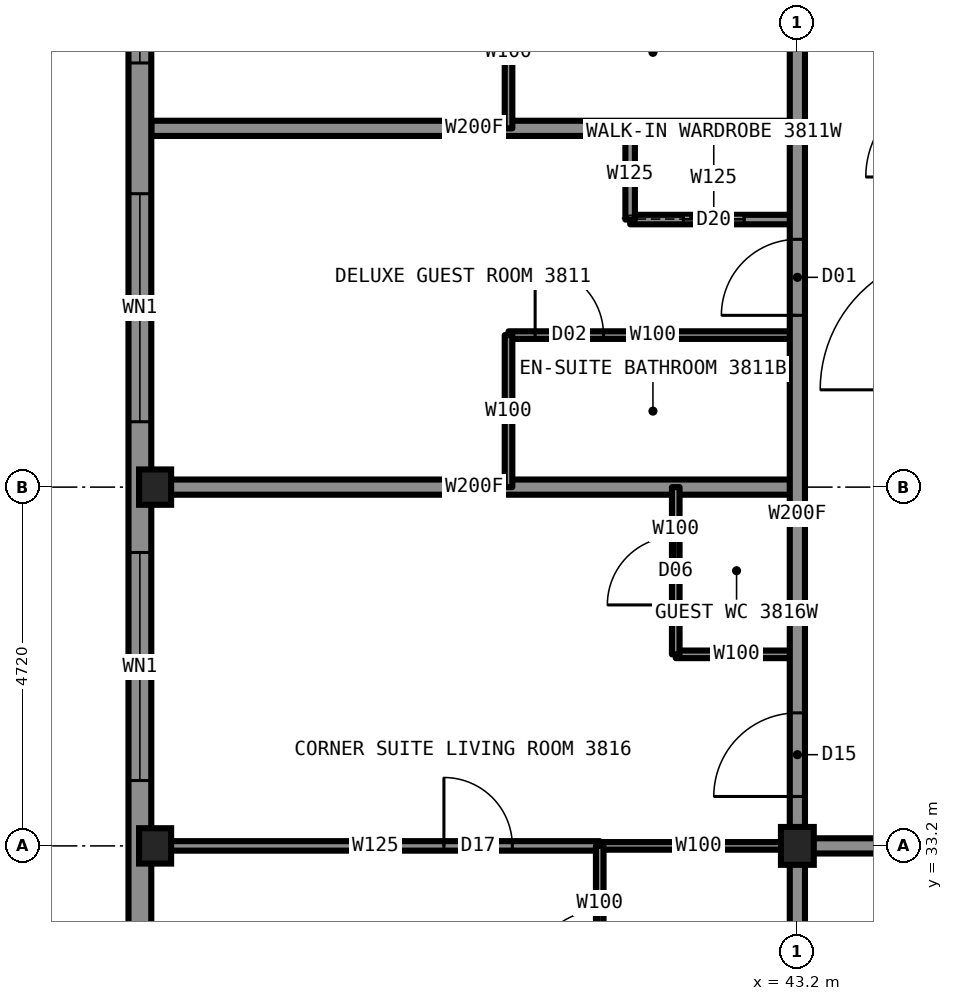
"""IFC4 building model, lengths in metres.
Left out: names, types, materials, properties, quantities, classifications, styles, units other than length and angle.
Written with IfcOpenShell. Run it as: python <this file> out.ifc"""

import sys

from ifc_helpers import new_model, si_unit, direction, frame, frame_2d, origin, origin_2d, place, context, subcontext, project, spatial, rectangle, i_section, extrude, element, fill, save


model = new_model("IFC4")
c1 = context("Model", 3, precision=1e-05, world=origin(), true_north=direction((0.0, 1.0)))
c2 = subcontext(c1, "Body", "Model", "MODEL_VIEW")
j1 = project(units=[si_unit("LENGTHUNIT", "METRE"), si_unit("PLANEANGLEUNIT", "RADIAN")], contexts=[c1])
p1 = place(None, origin())
s1 = spatial("IfcSite", under=j1, at=p1, CompositionType="ELEMENT")
p2 = place(p1, origin())
s2 = spatial("IfcBuilding", under=s1, at=p2, CompositionType="ELEMENT")
p3 = place(p2, frame((0.0, 0.0, 135.4)))
s3 = spatial("IfcBuildingStorey", under=s2, at=p3, CompositionType="ELEMENT", Elevation=135.4)
for number, where, z_axis, x_axis in (
    (1, (34.75, 33.2, 0.0), (0.0, 0.0, 1.0), (1.0, 0.0, 0.0)),
    (2, (34.75, 37.92, 0.0), (0.0, 0.0, 1.0), (1.0, 0.0, 0.0)),
):
    element("IfcColumn", number, at=place(p3, frame(where, z_axis=z_axis, x_axis=x_axis)), inside=s3, PredefinedType="COLUMN", context=c2, shape_type="SweptSolid", body=[
        extrude(i_section(OverallWidth=0.422, OverallDepth=0.465, WebThickness=0.045, FlangeThickness=0.073, at=origin_2d()), origin(), (0.0, 0.0, 1.0), 3.5),
    ])
p4 = place(p3, frame((43.2, 33.2, 0.0), z_axis=(0.0, 0.0, 1.0), x_axis=(1.0, 0.0, 0.0)))
e3 = element("IfcColumn", 3, at=p4, inside=s3, PredefinedType="COLUMN", context=c2, shape_type="SweptSolid", body=[
    extrude(i_section(OverallWidth=0.432, OverallDepth=0.498, WebThickness=0.056, FlangeThickness=0.089, at=origin_2d()), origin(), (0.0, 0.0, 1.0), 3.5),
])
p5 = place(p3, frame((40.6, 33.2, 0.0), z_axis=(0.0, 0.0, 1.0), x_axis=(1.0, 0.0, 0.0)))
e4 = element("IfcWall", 4, at=p5, inside=s3, PredefinedType="PARTITIONING", context=c2, shape_type="SweptSolid", body=[
    extrude(rectangle(XDim=2.6, YDim=0.1, at=frame_2d((1.3, 0.0))), origin(), (0.0, 0.0, 1.0), 2.573),
])
p6 = place(p3, frame((43.2, 33.2, 0.0), z_axis=(0.0, 0.0, 1.0), x_axis=(1.0, 0.0, 0.0)))
e5 = element("IfcWall", 5, at=p6, inside=s3, PredefinedType="PARTITIONING", context=c2, shape_type="SweptSolid", body=[
    extrude(rectangle(XDim=23.6, YDim=0.2, at=frame_2d((11.8, 0.0))), origin(), (0.0, 0.0, 1.0), 3.33),
])
p7 = place(p6, frame((3.0, 0.0, 0.0)))
e6 = element("IfcOpeningElement", 6, at=p7, cuts=e5, PredefinedType="OPENING", context=c2, shape_type="SweptSolid", body=[
    extrude(rectangle(XDim=1.0, YDim=2.2, at=frame_2d((0.5, 1.1))), frame((0.0, 0.11, 0.0), z_axis=(0.0, -1.0, 0.0), x_axis=(1.0, 0.0, 0.0)), (0.0, 0.0, 1.0), 0.22),
])
p8 = place(p6, frame((9.84, 0.0, 0.0)))
e7 = element("IfcOpeningElement", 7, at=p8, cuts=e5, PredefinedType="OPENING", context=c2, shape_type="SweptSolid", body=[
    extrude(rectangle(XDim=1.0, YDim=2.2, at=frame_2d((0.5, 1.1))), frame((0.0, 0.11, 0.0), z_axis=(0.0, -1.0, 0.0), x_axis=(1.0, 0.0, 0.0)), (0.0, 0.0, 1.0), 0.22),
])
p9 = place(p6, frame((16.71, 0.0, 0.0)))
e8 = element("IfcOpeningElement", 8, at=p9, cuts=e5, PredefinedType="OPENING", context=c2, shape_type="SweptSolid", body=[
    extrude(rectangle(XDim=1.0, YDim=2.2, at=frame_2d((0.5, 1.1))), frame((0.0, 0.11, 0.0), z_axis=(0.0, -1.0, 0.0), x_axis=(1.0, 0.0, 0.0)), (0.0, 0.0, 1.0), 0.22),
])
p10 = place(p6, frame((20.34, 0.0, 0.0)))
e9 = element("IfcOpeningElement", 9, at=p10, cuts=e5, PredefinedType="OPENING", context=c2, shape_type="SweptSolid", body=[
    extrude(rectangle(XDim=1.0, YDim=2.2, at=frame_2d((0.5, 1.1))), frame((0.0, 0.11, 0.0), z_axis=(0.0, -1.0, 0.0), x_axis=(1.0, 0.0, 0.0)), (0.0, 0.0, 1.0), 0.22),
])
p11 = place(p3, frame((34.7, 33.2, 0.0), z_axis=(0.0, 0.0, 1.0), x_axis=(1.0, 0.0, 0.0)))
e10 = element("IfcWall", 10, at=p11, inside=s3, PredefinedType="PARTITIONING", context=c2, shape_type="SweptSolid", body=[
    extrude(rectangle(XDim=5.9, YDim=0.125, at=frame_2d((2.95, 0.0))), origin(), (0.0, 0.0, 1.0), 2.573),
])
p12 = place(p11, frame((3.85, 0.0, 0.0)))
e11 = element("IfcOpeningElement", 11, at=p12, cuts=e10, PredefinedType="OPENING", context=c2, shape_type="SweptSolid", body=[
    extrude(rectangle(XDim=0.9, YDim=2.2, at=frame_2d((0.45, 1.1))), frame((0.0, 0.073, 0.0), z_axis=(0.0, -1.0, 0.0), x_axis=(1.0, 0.0, 0.0)), (0.0, 0.0, 1.0), 0.145),
])
p13 = place(p3, frame((34.7, 42.64, 0.0), z_axis=(0.0, 0.0, 1.0), x_axis=(1.0, 0.0, 0.0)))
e12 = element("IfcWall", 12, at=p13, inside=s3, PredefinedType="PARTITIONING", context=c2, shape_type="SweptSolid", body=[
    extrude(rectangle(XDim=8.5, YDim=0.2, at=frame_2d((4.25, 0.0))), origin(), (0.0, 0.0, 1.0), 2.731),
])
p14 = place(p3, frame((41.0, 41.44, 0.0), z_axis=(0.0, 0.0, 1.0), x_axis=(1.0, 0.0, 0.0)))
e13 = element("IfcWall", 13, at=p14, inside=s3, PredefinedType="PARTITIONING", context=c2, shape_type="SweptSolid", body=[
    extrude(rectangle(XDim=2.2, YDim=0.125, at=frame_2d((1.1, 0.0))), origin(), (0.0, 0.0, 1.0), 3.33),
])
p15 = place(p14, frame((0.7, 0.0, 0.0)))
e14 = element("IfcOpeningElement", 14, at=p15, cuts=e13, PredefinedType="OPENING", context=c2, shape_type="SweptSolid", body=[
    extrude(rectangle(XDim=0.8, YDim=2.1, at=frame_2d((0.4, 1.05))), frame((0.0, 0.073, 0.0), z_axis=(0.0, -1.0, 0.0), x_axis=(1.0, 0.0, 0.0)), (0.0, 0.0, 1.0), 0.145),
])
p16 = place(p3, frame((39.4, 39.92, 0.0), z_axis=(0.0, 0.0, 1.0), x_axis=(1.0, 0.0, 0.0)))
e15 = element("IfcWall", 15, at=p16, inside=s3, PredefinedType="PARTITIONING", context=c2, shape_type="SweptSolid", body=[
    extrude(rectangle(XDim=3.8, YDim=0.1, at=frame_2d((1.9, 0.0))), origin(), (0.0, 0.0, 1.0), 3.33),
])
p17 = place(p16, frame((0.35, 0.0, 0.0)))
e16 = element("IfcOpeningElement", 16, at=p17, cuts=e15, PredefinedType="OPENING", context=c2, shape_type="SweptSolid", body=[
    extrude(rectangle(XDim=0.9, YDim=2.1, at=frame_2d((0.45, 1.05))), frame((0.0, 0.06, 0.0), z_axis=(0.0, -1.0, 0.0), x_axis=(1.0, 0.0, 0.0)), (0.0, 0.0, 1.0), 0.12),
])
p18 = place(p3, frame((34.7, 37.92, 0.0), z_axis=(0.0, 0.0, 1.0), x_axis=(1.0, 0.0, 0.0)))
e17 = element("IfcWall", 17, at=p18, inside=s3, PredefinedType="PARTITIONING", context=c2, shape_type="SweptSolid", body=[
    extrude(rectangle(XDim=8.5, YDim=0.2, at=frame_2d((4.25, 0.0))), origin(), (0.0, 0.0, 1.0), 2.573),
])
p19 = place(p3, frame((41.6, 35.72, 0.0), z_axis=(0.0, 0.0, 1.0), x_axis=(1.0, 0.0, 0.0)))
e18 = element("IfcWall", 18, at=p19, inside=s3, PredefinedType="PARTITIONING", context=c2, shape_type="SweptSolid", body=[
    extrude(rectangle(XDim=1.6, YDim=0.1, at=frame_2d((0.8, 0.0))), origin(), (0.0, 0.0, 1.0), 3.33),
])
p20 = place(p3, frame((43.2, 33.2, 0.0), z_axis=(0.0, 0.0, 1.0), x_axis=(0.0, 1.0, 0.0)))
e19 = element("IfcWall", 19, at=p20, inside=s3, PredefinedType="PARTITIONING", context=c2, shape_type="SweptSolid", body=[
    extrude(rectangle(XDim=23.6, YDim=0.2, at=frame_2d((11.8, 0.0))), origin(), (0.0, 0.0, 1.0), 3.33),
])
p21 = place(p20, frame((6.98, 0.0, 0.0)))
e20 = element("IfcOpeningElement", 20, at=p21, cuts=e19, PredefinedType="OPENING", context=c2, shape_type="SweptSolid", body=[
    extrude(rectangle(XDim=1.0, YDim=2.2, at=frame_2d((0.5, 1.1))), frame((0.0, 0.11, 0.0), z_axis=(0.0, -1.0, 0.0), x_axis=(1.0, 0.0, 0.0)), (0.0, 0.0, 1.0), 0.22),
])
p22 = place(p20, frame((11.7, 0.0, 0.0)))
e21 = element("IfcOpeningElement", 21, at=p22, cuts=e19, PredefinedType="OPENING", context=c2, shape_type="SweptSolid", body=[
    extrude(rectangle(XDim=1.0, YDim=2.2, at=frame_2d((0.5, 1.1))), frame((0.0, 0.11, 0.0), z_axis=(0.0, -1.0, 0.0), x_axis=(1.0, 0.0, 0.0)), (0.0, 0.0, 1.0), 0.22),
])
p23 = place(p20, frame((15.62, 0.0, 0.0)))
e22 = element("IfcOpeningElement", 22, at=p23, cuts=e19, PredefinedType="OPENING", context=c2, shape_type="SweptSolid", body=[
    extrude(rectangle(XDim=1.0, YDim=2.2, at=frame_2d((0.5, 1.1))), frame((0.0, 0.11, 0.0), z_axis=(0.0, -1.0, 0.0), x_axis=(1.0, 0.0, 0.0)), (0.0, 0.0, 1.0), 0.22),
])
p24 = place(p20, frame((21.85, 0.0, 0.0)))
e23 = element("IfcOpeningElement", 23, at=p24, cuts=e19, PredefinedType="OPENING", context=c2, shape_type="SweptSolid", body=[
    extrude(rectangle(XDim=1.1, YDim=2.2, at=frame_2d((0.55, 1.1))), frame((0.0, 0.11, 0.0), z_axis=(0.0, -1.0, 0.0), x_axis=(1.0, 0.0, 0.0)), (0.0, 0.0, 1.0), 0.22),
])
p25 = place(p20, frame((0.65, 0.0, 0.0)))
e24 = element("IfcOpeningElement", 24, at=p25, cuts=e19, PredefinedType="OPENING", context=c2, shape_type="SweptSolid", body=[
    extrude(rectangle(XDim=1.1, YDim=2.2, at=frame_2d((0.55, 1.1))), frame((0.0, 0.11, 0.0), z_axis=(0.0, -1.0, 0.0), x_axis=(1.0, 0.0, 0.0)), (0.0, 0.0, 1.0), 0.22),
])
p26 = place(p3, frame((43.2, 24.7, 0.0), z_axis=(0.0, 0.0, 1.0), x_axis=(0.0, 1.0, 0.0)))
e25 = element("IfcWall", 25, at=p26, inside=s3, PredefinedType="PARTITIONING", context=c2, shape_type="SweptSolid", body=[
    extrude(rectangle(XDim=8.5, YDim=0.2, at=frame_2d((4.25, 0.0))), origin(), (0.0, 0.0, 1.0), 2.573),
])
p27 = place(p3, frame((41.6, 35.72, 0.0), z_axis=(0.0, 0.0, 1.0), x_axis=(0.0, 1.0, 0.0)))
e26 = element("IfcWall", 26, at=p27, inside=s3, PredefinedType="PARTITIONING", context=c2, shape_type="SweptSolid", body=[
    extrude(rectangle(XDim=2.2, YDim=0.1, at=frame_2d((1.1, 0.0))), origin(), (0.0, 0.0, 1.0), 3.33),
])
p28 = place(p27, frame((0.65, 0.0, 0.0)))
e27 = element("IfcOpeningElement", 27, at=p28, cuts=e26, PredefinedType="OPENING", context=c2, shape_type="SweptSolid", body=[
    extrude(rectangle(XDim=0.9, YDim=2.1, at=frame_2d((0.45, 1.05))), frame((0.0, 0.06, 0.0), z_axis=(0.0, -1.0, 0.0), x_axis=(1.0, 0.0, 0.0)), (0.0, 0.0, 1.0), 0.12),
])
p29 = place(p3, frame((41.0, 41.44, 0.0), z_axis=(0.0, 0.0, 1.0), x_axis=(0.0, 1.0, 0.0)))
e28 = element("IfcWall", 28, at=p29, inside=s3, PredefinedType="PARTITIONING", context=c2, shape_type="SweptSolid", body=[
    extrude(rectangle(XDim=1.2, YDim=0.125, at=frame_2d((0.6, 0.0))), origin(), (0.0, 0.0, 1.0), 3.33),
])
p30 = place(p3, frame((40.6, 30.6, 0.0), z_axis=(0.0, 0.0, 1.0), x_axis=(0.0, 1.0, 0.0)))
e29 = element("IfcWall", 29, at=p30, inside=s3, PredefinedType="PARTITIONING", context=c2, shape_type="SweptSolid", body=[
    extrude(rectangle(XDim=2.6, YDim=0.1, at=frame_2d((1.3, 0.0))), origin(), (0.0, 0.0, 1.0), 3.33),
])
p31 = place(p30, frame((0.85, 0.0, 0.0)))
e30 = element("IfcOpeningElement", 30, at=p31, cuts=e29, PredefinedType="OPENING", context=c2, shape_type="SweptSolid", body=[
    extrude(rectangle(XDim=0.9, YDim=2.1, at=frame_2d((0.45, 1.05))), frame((0.0, 0.06, 0.0), z_axis=(0.0, -1.0, 0.0), x_axis=(1.0, 0.0, 0.0)), (0.0, 0.0, 1.0), 0.12),
])
for number, where, z_axis, x_axis in (
    (31, (39.4, 37.92, 0.0), (0.0, 0.0, 1.0), (0.0, 1.0, 0.0)),
    (32, (39.4, 42.64, 0.0), (0.0, 0.0, 1.0), (0.0, 1.0, 0.0)),
):
    element("IfcWall", number, at=place(p3, frame(where, z_axis=z_axis, x_axis=x_axis)), inside=s3, PredefinedType="PARTITIONING", context=c2, shape_type="SweptSolid", body=[
        extrude(rectangle(XDim=2.0, YDim=0.1, at=frame_2d((1.0, 0.0))), origin(), (0.0, 0.0, 1.0), 3.33),
    ])
p32 = place(p3, frame((34.55, 60.1, 0.0), z_axis=(0.0, 0.0, 1.0), x_axis=(0.0, -1.0, 0.0)))
e33 = element("IfcWall", 33, at=p32, inside=s3, PredefinedType="SOLIDWALL", context=c2, shape_type="SweptSolid", body=[
    extrude(rectangle(XDim=30.2, YDim=0.3, at=frame_2d((15.1, 0.0))), origin(), (0.0, 0.0, 1.0), 2.83),
])
p33 = place(p32, frame((0.85, 0.0, 0.5)))
e34 = element("IfcOpeningElement", 34, at=p33, cuts=e33, PredefinedType="OPENING", context=c2, shape_type="SweptSolid", body=[
    extrude(rectangle(XDim=1.6, YDim=2.0, at=frame_2d((0.8, 1.0))), frame((0.0, 0.16, 0.0), z_axis=(0.0, -1.0, 0.0), x_axis=(1.0, 0.0, 0.0)), (0.0, 0.0, 1.0), 0.32),
])
p34 = place(p32, frame((4.16, 0.0, 0.5)))
e35 = element("IfcOpeningElement", 35, at=p34, cuts=e33, PredefinedType="OPENING", context=c2, shape_type="SweptSolid", body=[
    extrude(rectangle(XDim=1.3, YDim=1.9, at=frame_2d((0.65, 0.95))), frame((0.0, 0.16, 0.0), z_axis=(0.0, -1.0, 0.0), x_axis=(1.0, 0.0, 0.0)), (0.0, 0.0, 1.0), 0.32),
])
p35 = place(p32, frame((8.88, 0.0, 0.5)))
e36 = element("IfcOpeningElement", 36, at=p35, cuts=e33, PredefinedType="OPENING", context=c2, shape_type="SweptSolid", body=[
    extrude(rectangle(XDim=3.0, YDim=2.0, at=frame_2d((1.5, 1.0))), frame((0.0, 0.16, 0.0), z_axis=(0.0, -1.0, 0.0), x_axis=(1.0, 0.0, 0.0)), (0.0, 0.0, 1.0), 0.32),
])
p36 = place(p32, frame((13.6, 0.0, 0.5)))
e37 = element("IfcOpeningElement", 37, at=p36, cuts=e33, PredefinedType="OPENING", context=c2, shape_type="SweptSolid", body=[
    extrude(rectangle(XDim=3.0, YDim=2.0, at=frame_2d((1.5, 1.0))), frame((0.0, 0.16, 0.0), z_axis=(0.0, -1.0, 0.0), x_axis=(1.0, 0.0, 0.0)), (0.0, 0.0, 1.0), 0.32),
])
p37 = place(p32, frame((18.32, 0.0, 0.5)))
e38 = element("IfcOpeningElement", 38, at=p37, cuts=e33, PredefinedType="OPENING", context=c2, shape_type="SweptSolid", body=[
    extrude(rectangle(XDim=3.0, YDim=2.0, at=frame_2d((1.5, 1.0))), frame((0.0, 0.16, 0.0), z_axis=(0.0, -1.0, 0.0), x_axis=(1.0, 0.0, 0.0)), (0.0, 0.0, 1.0), 0.32),
])
p38 = place(p32, frame((24.69, 0.0, 0.5)))
e39 = element("IfcOpeningElement", 39, at=p38, cuts=e33, PredefinedType="OPENING", context=c2, shape_type="SweptSolid", body=[
    extrude(rectangle(XDim=1.3, YDim=1.9, at=frame_2d((0.65, 0.95))), frame((0.0, 0.16, 0.0), z_axis=(0.0, -1.0, 0.0), x_axis=(1.0, 0.0, 0.0)), (0.0, 0.0, 1.0), 0.32),
])
p39 = place(p32, frame((27.75, 0.0, 0.5)))
e40 = element("IfcOpeningElement", 40, at=p39, cuts=e33, PredefinedType="OPENING", context=c2, shape_type="SweptSolid", body=[
    extrude(rectangle(XDim=1.6, YDim=2.0, at=frame_2d((0.8, 1.0))), frame((0.0, 0.16, 0.0), z_axis=(0.0, -1.0, 0.0), x_axis=(1.0, 0.0, 0.0)), (0.0, 0.0, 1.0), 0.32),
])
p40 = place(p32, frame((5.51, 0.0, 0.5)))
e41 = element("IfcOpeningElement", 41, at=p40, cuts=e33, PredefinedType="OPENING", context=c2, shape_type="SweptSolid", body=[
    extrude(rectangle(XDim=0.7, YDim=0.9, at=frame_2d((0.35, 0.45))), frame((0.0, 0.16, 0.0), z_axis=(0.0, -1.0, 0.0), x_axis=(1.0, 0.0, 0.0)), (0.0, 0.0, 1.0), 0.32),
])
p41 = place(p32, frame((23.99, 0.0, 0.5)))
e42 = element("IfcOpeningElement", 42, at=p41, cuts=e33, PredefinedType="OPENING", context=c2, shape_type="SweptSolid", body=[
    extrude(rectangle(XDim=0.7, YDim=0.9, at=frame_2d((0.35, 0.45))), frame((0.0, 0.16, 0.0), z_axis=(0.0, -1.0, 0.0), x_axis=(1.0, 0.0, 0.0)), (0.0, 0.0, 1.0), 0.32),
])
p42 = place(p21, origin())
e43 = element("IfcDoor", 43, at=p42, inside=s3, OperationType="SINGLE_SWING_LEFT", PredefinedType="DOOR", context=c2, shape_type="SweptSolid", body=[
    extrude(rectangle(XDim=1.0, YDim=2.2, at=frame_2d((0.5, 1.1))), frame((0.0, 0.025, 0.0), z_axis=(0.0, -1.0, 0.0), x_axis=(1.0, 0.0, 0.0)), (0.0, 0.0, 1.0), 0.05),
])
fill(e20, e43)
p43 = place(p17, origin())
e44 = element("IfcDoor", 44, at=p43, inside=s3, OperationType="SINGLE_SWING_RIGHT", PredefinedType="DOOR", context=c2, shape_type="SweptSolid", body=[
    extrude(rectangle(XDim=0.9, YDim=2.1, at=frame_2d((0.45, 1.05))), frame((0.0, 0.025, 0.0), z_axis=(0.0, -1.0, 0.0), x_axis=(1.0, 0.0, 0.0)), (0.0, 0.0, 1.0), 0.05),
])
fill(e16, e44)
p44 = place(p15, origin())
e45 = element("IfcDoor", 45, at=p44, inside=s3, OperationType="SLIDING_TO_LEFT", PredefinedType="DOOR", context=c2, shape_type="SweptSolid", body=[
    extrude(rectangle(XDim=0.8, YDim=2.1, at=frame_2d((0.4, 1.05))), frame((0.0, 0.025, 0.0), z_axis=(0.0, -1.0, 0.0), x_axis=(1.0, 0.0, 0.0)), (0.0, 0.0, 1.0), 0.05),
])
fill(e14, e45)
p45 = place(p25, origin())
e46 = element("IfcDoor", 46, at=p45, inside=s3, OperationType="SINGLE_SWING_LEFT", PredefinedType="DOOR", context=c2, shape_type="SweptSolid", body=[
    extrude(rectangle(XDim=1.1, YDim=2.2, at=frame_2d((0.55, 1.1))), frame((0.0, 0.025, 0.0), z_axis=(0.0, -1.0, 0.0), x_axis=(1.0, 0.0, 0.0)), (0.0, 0.0, 1.0), 0.05),
])
fill(e24, e46)
p46 = place(p31, origin())
e47 = element("IfcDoor", 47, at=p46, inside=s3, OperationType="SINGLE_SWING_RIGHT", PredefinedType="DOOR", context=c2, shape_type="SweptSolid", body=[
    extrude(rectangle(XDim=0.9, YDim=2.1, at=frame_2d((0.45, 1.05))), frame((0.0, 0.025, 0.0), z_axis=(0.0, -1.0, 0.0), x_axis=(1.0, 0.0, 0.0)), (0.0, 0.0, 1.0), 0.05),
])
fill(e30, e47)
p47 = place(p12, origin())
e48 = element("IfcDoor", 48, at=p47, inside=s3, OperationType="SINGLE_SWING_LEFT", PredefinedType="DOOR", context=c2, shape_type="SweptSolid", body=[
    extrude(rectangle(XDim=0.9, YDim=2.2, at=frame_2d((0.45, 1.1))), frame((0.0, 0.025, 0.0), z_axis=(0.0, -1.0, 0.0), x_axis=(1.0, 0.0, 0.0)), (0.0, 0.0, 1.0), 0.05),
])
fill(e11, e48)
p48 = place(p28, origin())
e49 = element("IfcDoor", 49, at=p48, inside=s3, OperationType="SINGLE_SWING_LEFT", PredefinedType="DOOR", context=c2, shape_type="SweptSolid", body=[
    extrude(rectangle(XDim=0.9, YDim=2.1, at=frame_2d((0.45, 1.05))), frame((0.0, 0.025, 0.0), z_axis=(0.0, -1.0, 0.0), x_axis=(1.0, 0.0, 0.0)), (0.0, 0.0, 1.0), 0.05),
])
fill(e27, e49)
p49 = place(p36, origin())
e50 = element("IfcWindow", 50, at=p49, inside=s3, PartitioningType="SINGLE_PANEL", PredefinedType="WINDOW", context=c2, shape_type="SweptSolid", body=[
    extrude(rectangle(XDim=3.0, YDim=2.0, at=frame_2d((1.5, 1.0))), frame((0.0, 0.03, 0.0), z_axis=(0.0, -1.0, 0.0), x_axis=(1.0, 0.0, 0.0)), (0.0, 0.0, 1.0), 0.06),
])
fill(e37, e50)
p50 = place(p37, origin())
e51 = element("IfcWindow", 51, at=p50, inside=s3, PartitioningType="SINGLE_PANEL", PredefinedType="WINDOW", context=c2, shape_type="SweptSolid", body=[
    extrude(rectangle(XDim=3.0, YDim=2.0, at=frame_2d((1.5, 1.0))), frame((0.0, 0.03, 0.0), z_axis=(0.0, -1.0, 0.0), x_axis=(1.0, 0.0, 0.0)), (0.0, 0.0, 1.0), 0.06),
])
fill(e38, e51)
p51 = place(p38, origin())
e52 = element("IfcWindow", 52, at=p51, inside=s3, PartitioningType="SINGLE_PANEL", PredefinedType="WINDOW", context=c2, shape_type="SweptSolid", body=[
    extrude(rectangle(XDim=1.3, YDim=1.9, at=frame_2d((0.65, 0.95))), frame((0.0, 0.03, 0.0), z_axis=(0.0, -1.0, 0.0), x_axis=(1.0, 0.0, 0.0)), (0.0, 0.0, 1.0), 0.06),
])
fill(e39, e52)
p52 = place(p39, origin())
e53 = element("IfcWindow", 53, at=p52, inside=s3, PartitioningType="SINGLE_PANEL", PredefinedType="WINDOW", context=c2, shape_type="SweptSolid", body=[
    extrude(rectangle(XDim=1.6, YDim=2.0, at=frame_2d((0.8, 1.0))), frame((0.0, 0.03, 0.0), z_axis=(0.0, -1.0, 0.0), x_axis=(1.0, 0.0, 0.0)), (0.0, 0.0, 1.0), 0.06),
])
fill(e40, e53)
p53 = place(p41, origin())
e54 = element("IfcWindow", 54, at=p53, inside=s3, PartitioningType="SINGLE_PANEL", PredefinedType="WINDOW", context=c2, shape_type="SweptSolid", body=[
    extrude(rectangle(XDim=0.7, YDim=0.9, at=frame_2d((0.35, 0.45))), frame((0.0, 0.03, 0.0), z_axis=(0.0, -1.0, 0.0), x_axis=(1.0, 0.0, 0.0)), (0.0, 0.0, 1.0), 0.06),
])
fill(e42, e54)
save(model, sys.argv[1])
